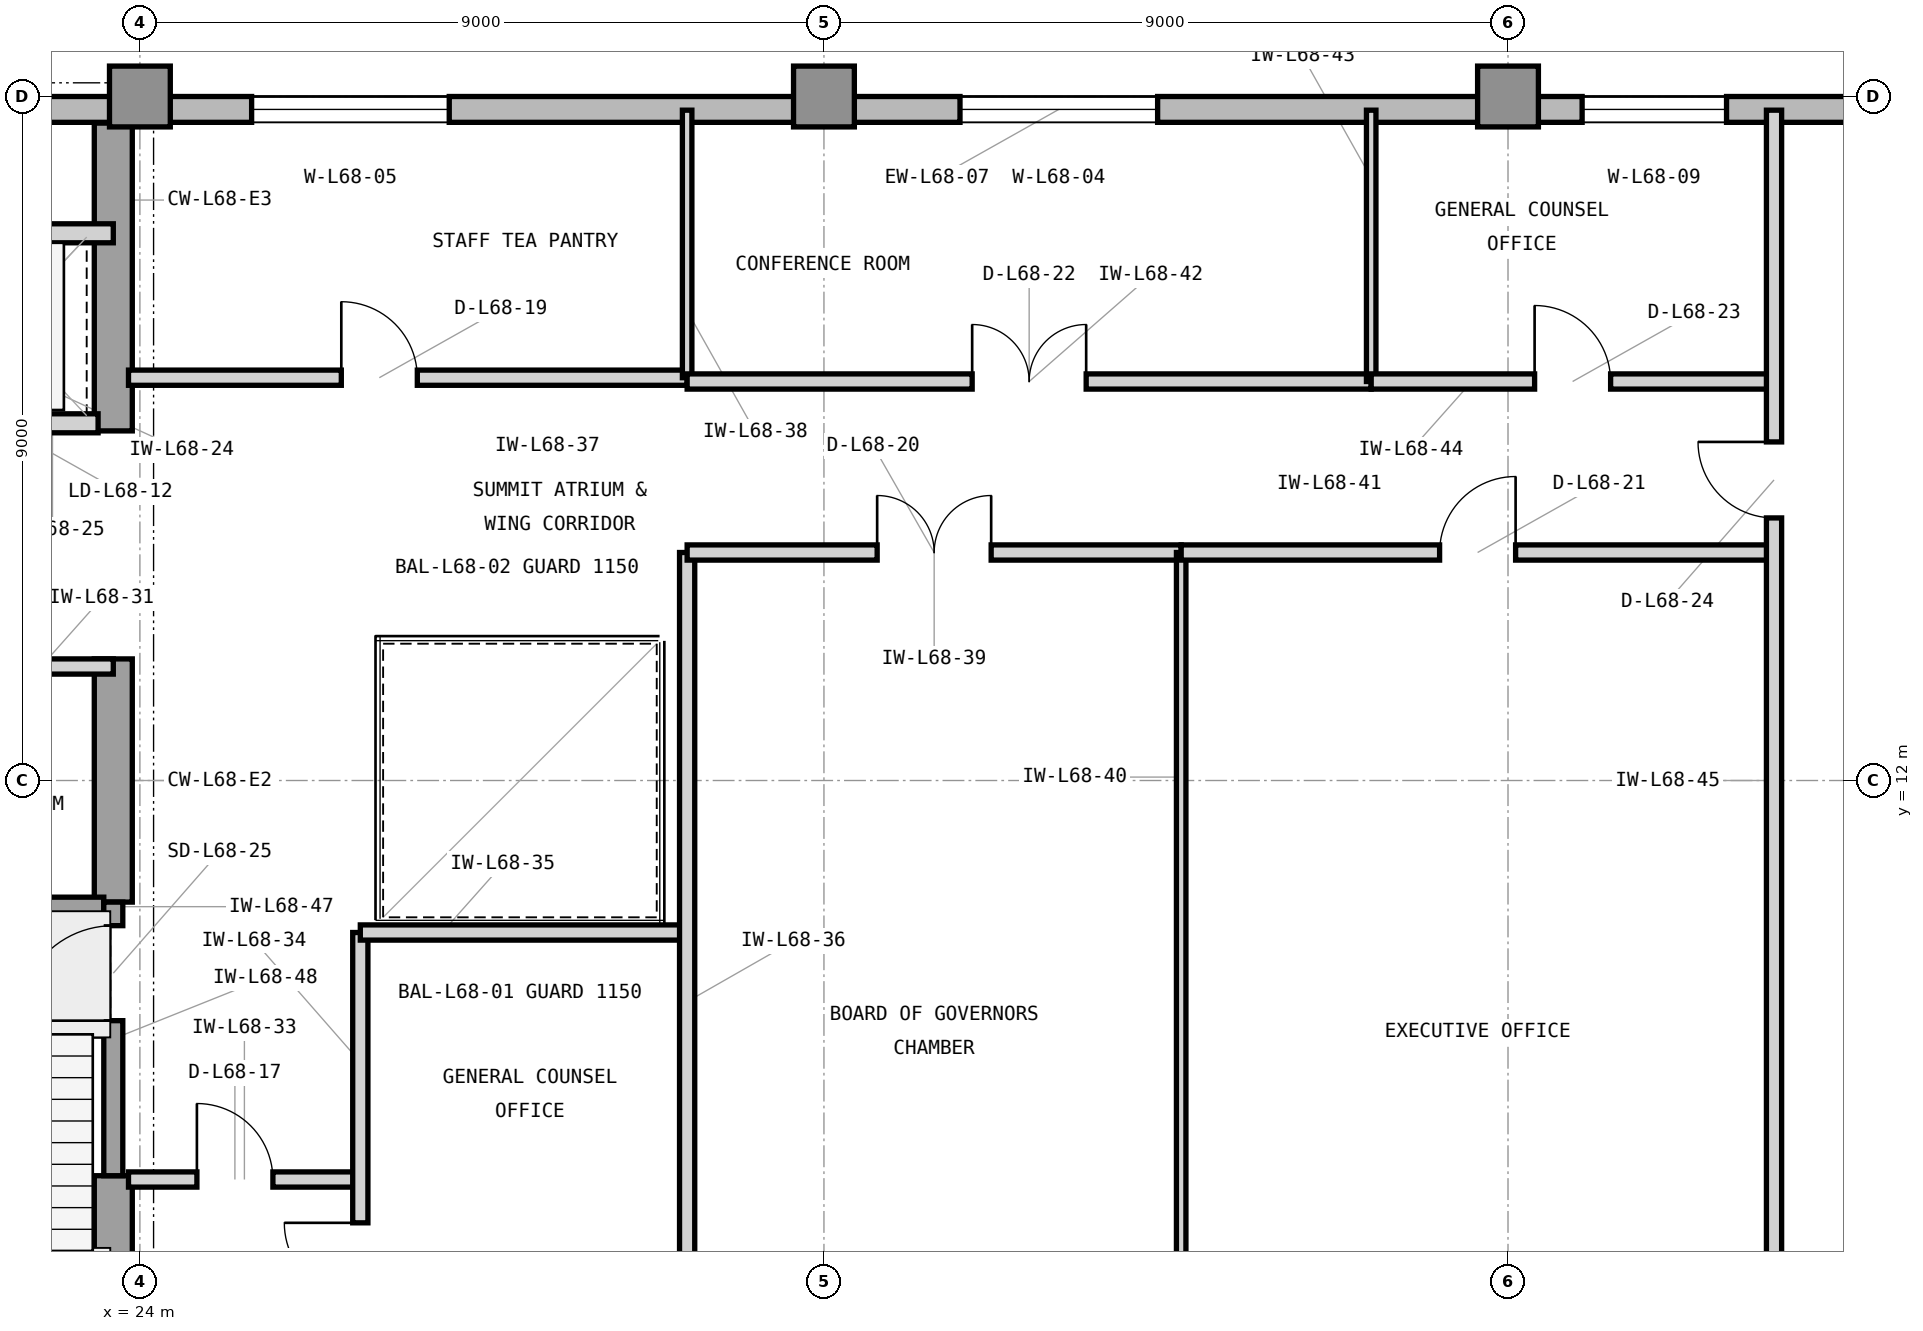
"""IFC4 building model, lengths in metres.
Left out: names, types, materials, properties, quantities, classifications, styles, units other than length and angle.
Written with IfcOpenShell. Run it as: python <this file> out.ifc"""

import sys

from ifc_helpers import new_model, si_unit, direction, frame, frame_2d, origin, origin_2d, place, context, subcontext, project, spatial, rectangle, extrude, element, fill, save


model = new_model("IFC4")
c1 = context("Model", 3, precision=1e-05, world=origin(), true_north=direction((0.0, 1.0)))
c2 = subcontext(c1, "Body", "Model", "MODEL_VIEW")
j1 = project(units=[si_unit("LENGTHUNIT", "METRE"), si_unit("PLANEANGLEUNIT", "RADIAN")], contexts=[c1])
p1 = place(None, origin())
s1 = spatial("IfcSite", under=j1, at=p1, CompositionType="ELEMENT")
p2 = place(p1, origin())
s2 = spatial("IfcBuilding", under=s1, at=p2, CompositionType="ELEMENT")
p3 = place(p2, frame((0.0, 0.0, 278.1)))
s3 = spatial("IfcBuildingStorey", under=s2, at=p3, CompositionType="ELEMENT", Elevation=278.1)
p4 = place(p3, frame((23.65, 3.6, 0.0), z_axis=(0.0, 0.0, 1.0), x_axis=(0.0, 1.0, 0.0)))
e1 = element("IfcWall", 1, at=p4, inside=s3, PredefinedType="SHEAR", context=c2, shape_type="SweptSolid", body=[
    extrude(rectangle(XDim=3.2, YDim=0.5, at=frame_2d((1.6, 0.0))), origin(), (0.0, 0.0, 1.0), 3.9),
])
p5 = place(p3, frame((23.65, 10.4, 0.0), z_axis=(0.0, 0.0, 1.0), x_axis=(0.0, 1.0, 0.0)))
e2 = element("IfcWall", 2, at=p5, inside=s3, PredefinedType="SHEAR", context=c2, shape_type="SweptSolid", body=[
    extrude(rectangle(XDim=3.2, YDim=0.5, at=frame_2d((1.6, 0.0))), origin(), (0.0, 0.0, 1.0), 3.9),
])
p6 = place(p3, frame((23.65, 16.6, 0.0), z_axis=(0.0, 0.0, 1.0), x_axis=(0.0, 1.0, 0.0)))
e3 = element("IfcWall", 3, at=p6, inside=s3, PredefinedType="SHEAR", context=c2, shape_type="SweptSolid", body=[
    extrude(rectangle(XDim=4.05, YDim=0.5, at=frame_2d((2.025, 0.0))), origin(), (0.0, 0.0, 1.0), 3.9),
])
for number, where, z_axis, x_axis in (
    (4, (24.0, 21.0, 0.0), (0.0, 0.0, 1.0), (1.0, 0.0, 0.0)),
    (5, (33.0, 21.0, 0.0), (0.0, 0.0, 1.0), (1.0, 0.0, 0.0)),
    (6, (42.0, 21.0, 0.0), (0.0, 0.0, 1.0), (1.0, 0.0, 0.0)),
):
    element("IfcColumn", number, at=place(p3, frame(where, z_axis=z_axis, x_axis=x_axis)), inside=s3, PredefinedType="COLUMN", context=c2, shape_type="SweptSolid", body=[
        extrude(rectangle(XDim=0.8, YDim=0.8, at=origin_2d()), origin(), (0.0, 0.0, 1.0), 3.9),
    ])
p7 = place(p3, frame((52.4, 20.83, 0.0), z_axis=(0.0, 0.0, 1.0), x_axis=(-1.0, 0.0, 0.0)))
e7 = element("IfcWall", 7, at=p7, inside=s3, PredefinedType="STANDARD", context=c2, shape_type="SweptSolid", body=[
    extrude(rectangle(XDim=32.62, YDim=0.34, at=frame_2d((16.31, 0.0))), origin(), (0.0, 0.0, 1.0), 3.715),
])
p8 = place(p7, frame((15.01, 0.0, 0.8)))
e8 = element("IfcOpeningElement", 8, at=p8, cuts=e7, PredefinedType="OPENING", context=c2, shape_type="SweptSolid", body=[
    extrude(rectangle(XDim=2.6, YDim=2.35, at=frame_2d((1.3, 1.175))), frame((0.0, 0.18, 0.0), z_axis=(0.0, -1.0, 0.0), x_axis=(1.0, 0.0, 0.0)), (0.0, 0.0, 1.0), 0.36),
])
p9 = place(p7, frame((24.33, 0.0, 0.8)))
e9 = element("IfcOpeningElement", 9, at=p9, cuts=e7, PredefinedType="OPENING", context=c2, shape_type="SweptSolid", body=[
    extrude(rectangle(XDim=2.6, YDim=2.35, at=frame_2d((1.3, 1.175))), frame((0.0, 0.18, 0.0), z_axis=(0.0, -1.0, 0.0), x_axis=(1.0, 0.0, 0.0)), (0.0, 0.0, 1.0), 0.36),
])
p10 = place(p7, frame((7.525, 0.0, 0.8)))
e10 = element("IfcOpeningElement", 10, at=p10, cuts=e7, PredefinedType="OPENING", context=c2, shape_type="SweptSolid", body=[
    extrude(rectangle(XDim=1.9, YDim=2.35, at=frame_2d((0.95, 1.175))), frame((0.0, 0.18, 0.0), z_axis=(0.0, -1.0, 0.0), x_axis=(1.0, 0.0, 0.0)), (0.0, 0.0, 1.0), 0.36),
])
p11 = place(p3, frame((21.05, 16.7, 0.0), z_axis=(0.0, 0.0, 1.0), x_axis=(1.0, 0.0, 0.0)))
e11 = element("IfcWall", 11, at=p11, inside=s3, PredefinedType="PARTITIONING", context=c2, shape_type="SweptSolid", body=[
    extrude(rectangle(XDim=2.4, YDim=0.25, at=frame_2d((1.2, 0.0))), origin(), (0.0, 0.0, 1.0), 3.088),
])
p12 = place(p11, frame((0.52, 0.0, 0.0)))
e12 = element("IfcOpeningElement", 12, at=p12, cuts=e11, PredefinedType="OPENING", context=c2, shape_type="SweptSolid", body=[
    extrude(rectangle(XDim=1.15, YDim=2.25, at=frame_2d((0.575, 1.125))), frame((0.0, 0.135, 0.0), z_axis=(0.0, -1.0, 0.0), x_axis=(1.0, 0.0, 0.0)), (0.0, 0.0, 1.0), 0.27),
])
p13 = place(p3, frame((16.45, 19.2, 0.0), z_axis=(0.0, 0.0, 1.0), x_axis=(1.0, 0.0, 0.0)))
e13 = element("IfcWall", 13, at=p13, inside=s3, PredefinedType="PARTITIONING", context=c2, shape_type="SweptSolid", body=[
    extrude(rectangle(XDim=7.2, YDim=0.25, at=frame_2d((3.6, 0.0))), origin(), (0.0, 0.0, 1.0), 3.705),
])
p14 = place(p3, frame((19.85, 13.5, 0.0), z_axis=(0.0, 0.0, 1.0), x_axis=(1.0, 0.0, 0.0)))
e14 = element("IfcWall", 14, at=p14, inside=s3, PredefinedType="PARTITIONING", context=c2, shape_type="SweptSolid", body=[
    extrude(rectangle(XDim=3.8, YDim=0.2, at=frame_2d((1.9, 0.0))), origin(), (0.0, 0.0, 1.0), 3.088),
])
p15 = place(p14, frame((1.425, 0.0, 0.0)))
e15 = element("IfcOpeningElement", 15, at=p15, cuts=e14, PredefinedType="OPENING", context=c2, shape_type="SweptSolid", body=[
    extrude(rectangle(XDim=0.95, YDim=2.1, at=frame_2d((0.475, 1.05))), frame((0.0, 0.11, 0.0), z_axis=(0.0, -1.0, 0.0), x_axis=(1.0, 0.0, 0.0)), (0.0, 0.0, 1.0), 0.22),
])
p16 = place(p3, frame((23.85, 6.75, 0.0), z_axis=(0.0, 0.0, 1.0), x_axis=(1.0, 0.0, 0.0)))
e16 = element("IfcWall", 16, at=p16, inside=s3, PredefinedType="PARTITIONING", context=c2, shape_type="SweptSolid", body=[
    extrude(rectangle(XDim=3.05, YDim=0.2, at=frame_2d((1.525, 0.0))), origin(), (0.0, 0.0, 1.0), 3.705),
])
p17 = place(p16, frame((0.9, 0.0, 0.0)))
e17 = element("IfcOpeningElement", 17, at=p17, cuts=e16, PredefinedType="OPENING", context=c2, shape_type="SweptSolid", body=[
    extrude(rectangle(XDim=1.0, YDim=2.15, at=frame_2d((0.5, 1.075))), frame((0.0, 0.11, 0.0), z_axis=(0.0, -1.0, 0.0), x_axis=(1.0, 0.0, 0.0)), (0.0, 0.0, 1.0), 0.22),
])
p18 = place(p3, frame((26.9, 3.18, 0.0), z_axis=(0.0, 0.0, 1.0), x_axis=(0.0, 1.0, 0.0)))
e18 = element("IfcWall", 18, at=p18, inside=s3, PredefinedType="PARTITIONING", context=c2, shape_type="SweptSolid", body=[
    extrude(rectangle(XDim=6.82, YDim=0.2, at=frame_2d((3.41, 0.0))), origin(), (0.0, 0.0, 1.0), 3.705),
])
p19 = place(p18, frame((2.0, 0.0, 0.0)))
e19 = element("IfcOpeningElement", 19, at=p19, cuts=e18, PredefinedType="OPENING", context=c2, shape_type="SweptSolid", body=[
    extrude(rectangle(XDim=1.0, YDim=2.15, at=frame_2d((0.5, 1.075))), frame((0.0, 0.11, 0.0), z_axis=(0.0, -1.0, 0.0), x_axis=(1.0, 0.0, 0.0)), (0.0, 0.0, 1.0), 0.22),
])
p20 = place(p3, frame((26.9, 10.0, 0.0), z_axis=(0.0, 0.0, 1.0), x_axis=(1.0, 0.0, 0.0)))
e20 = element("IfcWall", 20, at=p20, inside=s3, PredefinedType="PARTITIONING", context=c2, shape_type="SweptSolid", body=[
    extrude(rectangle(XDim=4.3, YDim=0.2, at=frame_2d((2.15, 0.0))), origin(), (0.0, 0.0, 1.0), 3.705),
])
p21 = place(p3, frame((31.2, 3.18, 0.0), z_axis=(0.0, 0.0, 1.0), x_axis=(0.0, 1.0, 0.0)))
e21 = element("IfcWall", 21, at=p21, inside=s3, PredefinedType="PARTITIONING", context=c2, shape_type="SweptSolid", body=[
    extrude(rectangle(XDim=11.82, YDim=0.2, at=frame_2d((5.91, 0.0))), origin(), (0.0, 0.0, 1.0), 3.705),
])
p22 = place(p3, frame((23.85, 17.3, 0.0), z_axis=(0.0, 0.0, 1.0), x_axis=(1.0, 0.0, 0.0)))
e22 = element("IfcWall", 22, at=p22, inside=s3, PredefinedType="PARTITIONING", context=c2, shape_type="SweptSolid", body=[
    extrude(rectangle(XDim=7.35, YDim=0.2, at=frame_2d((3.675, 0.0))), origin(), (0.0, 0.0, 1.0), 3.705),
])
p23 = place(p22, frame((2.8, 0.0, 0.0)))
e23 = element("IfcOpeningElement", 23, at=p23, cuts=e22, PredefinedType="OPENING", context=c2, shape_type="SweptSolid", body=[
    extrude(rectangle(XDim=1.0, YDim=2.15, at=frame_2d((0.5, 1.075))), frame((0.0, 0.11, 0.0), z_axis=(0.0, -1.0, 0.0), x_axis=(1.0, 0.0, 0.0)), (0.0, 0.0, 1.0), 0.22),
])
p24 = place(p3, frame((31.2, 17.3, 0.0), z_axis=(0.0, 0.0, 1.0), x_axis=(0.0, 1.0, 0.0)))
e24 = element("IfcWall", 24, at=p24, inside=s3, PredefinedType="PARTITIONING", context=c2, shape_type="SweptSolid", body=[
    extrude(rectangle(XDim=3.52, YDim=0.125, at=frame_2d((1.76, 0.0))), origin(), (0.0, 0.0, 1.0), 3.705),
])
p25 = place(p3, frame((31.2, 15.0, 0.0), z_axis=(0.0, 0.0, 1.0), x_axis=(1.0, 0.0, 0.0)))
e25 = element("IfcWall", 25, at=p25, inside=s3, PredefinedType="PARTITIONING", context=c2, shape_type="SweptSolid", body=[
    extrude(rectangle(XDim=6.5, YDim=0.2, at=frame_2d((3.25, 0.0))), origin(), (0.0, 0.0, 1.0), 3.301),
])
p26 = place(p25, frame((2.5, 0.0, 0.0)))
e26 = element("IfcOpeningElement", 26, at=p26, cuts=e25, PredefinedType="OPENING", context=c2, shape_type="SweptSolid", body=[
    extrude(rectangle(XDim=1.5, YDim=2.3, at=frame_2d((0.75, 1.15))), frame((0.0, 0.11, 0.0), z_axis=(0.0, -1.0, 0.0), x_axis=(1.0, 0.0, 0.0)), (0.0, 0.0, 1.0), 0.22),
])
p27 = place(p3, frame((37.7, 3.18, 0.0), z_axis=(0.0, 0.0, 1.0), x_axis=(0.0, 1.0, 0.0)))
e27 = element("IfcWall", 27, at=p27, inside=s3, PredefinedType="PARTITIONING", context=c2, shape_type="SweptSolid", body=[
    extrude(rectangle(XDim=11.82, YDim=0.125, at=frame_2d((5.91, 0.0))), origin(), (0.0, 0.0, 1.0), 3.705),
])
p28 = place(p3, frame((37.7, 15.0, 0.0), z_axis=(0.0, 0.0, 1.0), x_axis=(1.0, 0.0, 0.0)))
e28 = element("IfcWall", 28, at=p28, inside=s3, PredefinedType="PARTITIONING", context=c2, shape_type="SweptSolid", body=[
    extrude(rectangle(XDim=7.8, YDim=0.2, at=frame_2d((3.9, 0.0))), origin(), (0.0, 0.0, 1.0), 3.301),
])
p29 = place(p28, frame((3.4, 0.0, 0.0)))
e29 = element("IfcOpeningElement", 29, at=p29, cuts=e28, PredefinedType="OPENING", context=c2, shape_type="SweptSolid", body=[
    extrude(rectangle(XDim=1.0, YDim=2.15, at=frame_2d((0.5, 1.075))), frame((0.0, 0.11, 0.0), z_axis=(0.0, -1.0, 0.0), x_axis=(1.0, 0.0, 0.0)), (0.0, 0.0, 1.0), 0.22),
])
p30 = place(p3, frame((31.2, 17.25, 0.0), z_axis=(0.0, 0.0, 1.0), x_axis=(1.0, 0.0, 0.0)))
e30 = element("IfcWall", 30, at=p30, inside=s3, PredefinedType="PARTITIONING", context=c2, shape_type="SweptSolid", body=[
    extrude(rectangle(XDim=9.0, YDim=0.2, at=frame_2d((4.5, 0.0))), origin(), (0.0, 0.0, 1.0), 3.705),
])
p31 = place(p30, frame((3.75, 0.0, 0.0)))
e31 = element("IfcOpeningElement", 31, at=p31, cuts=e30, PredefinedType="OPENING", context=c2, shape_type="SweptSolid", body=[
    extrude(rectangle(XDim=1.5, YDim=2.3, at=frame_2d((0.75, 1.15))), frame((0.0, 0.11, 0.0), z_axis=(0.0, -1.0, 0.0), x_axis=(1.0, 0.0, 0.0)), (0.0, 0.0, 1.0), 0.22),
])
p32 = place(p3, frame((40.2, 17.25, 0.0), z_axis=(0.0, 0.0, 1.0), x_axis=(0.0, 1.0, 0.0)))
e32 = element("IfcWall", 32, at=p32, inside=s3, PredefinedType="PARTITIONING", context=c2, shape_type="SweptSolid", body=[
    extrude(rectangle(XDim=3.57, YDim=0.125, at=frame_2d((1.785, 0.0))), origin(), (0.0, 0.0, 1.0), 3.705),
])
p33 = place(p3, frame((40.2, 17.25, 0.0), z_axis=(0.0, 0.0, 1.0), x_axis=(1.0, 0.0, 0.0)))
e33 = element("IfcWall", 33, at=p33, inside=s3, PredefinedType="PARTITIONING", context=c2, shape_type="SweptSolid", body=[
    extrude(rectangle(XDim=5.3, YDim=0.2, at=frame_2d((2.65, 0.0))), origin(), (0.0, 0.0, 1.0), 3.705),
])
p34 = place(p33, frame((2.15, 0.0, 0.0)))
e34 = element("IfcOpeningElement", 34, at=p34, cuts=e33, PredefinedType="OPENING", context=c2, shape_type="SweptSolid", body=[
    extrude(rectangle(XDim=1.0, YDim=2.15, at=frame_2d((0.5, 1.075))), frame((0.0, 0.11, 0.0), z_axis=(0.0, -1.0, 0.0), x_axis=(1.0, 0.0, 0.0)), (0.0, 0.0, 1.0), 0.22),
])
p35 = place(p3, frame((45.5, 3.18, 0.0), z_axis=(0.0, 0.0, 1.0), x_axis=(0.0, 1.0, 0.0)))
e35 = element("IfcWall", 35, at=p35, inside=s3, PredefinedType="PARTITIONING", context=c2, shape_type="SweptSolid", body=[
    extrude(rectangle(XDim=17.64, YDim=0.2, at=frame_2d((8.82, 0.0))), origin(), (0.0, 0.0, 1.0), 3.705),
])
p36 = place(p35, frame((12.275, 0.0, 0.0)))
e36 = element("IfcOpeningElement", 36, at=p36, cuts=e35, PredefinedType="OPENING", context=c2, shape_type="SweptSolid", body=[
    extrude(rectangle(XDim=1.0, YDim=2.15, at=frame_2d((0.5, 1.075))), frame((0.0, 0.11, 0.0), z_axis=(0.0, -1.0, 0.0), x_axis=(1.0, 0.0, 0.0)), (0.0, 0.0, 1.0), 0.22),
])
p37 = place(p3, frame((19.705, 10.34, 0.0), z_axis=(0.0, 0.0, 1.0), x_axis=(1.0, 0.0, 0.0)))
e37 = element("IfcWall", 37, at=p37, inside=s3, PredefinedType="SHEAR", context=c2, shape_type="SweptSolid", body=[
    extrude(rectangle(XDim=3.82, YDim=0.25, at=frame_2d((1.91, 0.0))), origin(), (0.0, 0.0, 1.0), 3.9),
])
p38 = place(p3, frame((23.65, 6.8, 0.0), z_axis=(0.0, 0.0, 1.0), x_axis=(0.0, 1.0, 0.0)))
e38 = element("IfcWall", 38, at=p38, inside=s3, PredefinedType="SHEAR", context=c2, shape_type="SweptSolid", body=[
    extrude(rectangle(XDim=3.6, YDim=0.25, at=frame_2d((1.8, 0.0))), origin(), (0.0, 0.0, 1.0), 3.9),
])
p39 = place(p38, frame((2.04, 0.0, 0.0)))
e39 = element("IfcOpeningElement", 39, at=p39, cuts=e38, PredefinedType="OPENING", context=c2, shape_type="SweptSolid", body=[
    extrude(rectangle(XDim=1.25, YDim=2.2, at=frame_2d((0.625, 1.1))), frame((0.0, 0.135, 0.0), z_axis=(0.0, -1.0, 0.0), x_axis=(1.0, 0.0, 0.0)), (0.0, 0.0, 1.0), 0.27),
])
p40 = place(p8, origin())
e40 = element("IfcWindow", 40, at=p40, inside=s3, PartitioningType="SINGLE_PANEL", PredefinedType="WINDOW", context=c2, shape_type="SweptSolid", body=[
    extrude(rectangle(XDim=2.6, YDim=2.35, at=frame_2d((1.3, 1.175))), frame((0.0, 0.11, 0.0), z_axis=(0.0, -1.0, 0.0), x_axis=(1.0, 0.0, 0.0)), (0.0, 0.0, 1.0), 0.06),
])
fill(e8, e40)
p41 = place(p9, origin())
e41 = element("IfcWindow", 41, at=p41, inside=s3, PartitioningType="SINGLE_PANEL", PredefinedType="WINDOW", context=c2, shape_type="SweptSolid", body=[
    extrude(rectangle(XDim=2.6, YDim=2.35, at=frame_2d((1.3, 1.175))), frame((0.0, 0.11, 0.0), z_axis=(0.0, -1.0, 0.0), x_axis=(1.0, 0.0, 0.0)), (0.0, 0.0, 1.0), 0.06),
])
fill(e9, e41)
p42 = place(p17, origin())
e42 = element("IfcDoor", 42, at=p42, inside=s3, OperationType="SINGLE_SWING_LEFT", PredefinedType="DOOR", context=c2, shape_type="SweptSolid", body=[
    extrude(rectangle(XDim=1.0, YDim=2.15, at=frame_2d((0.5, 1.075))), frame((0.0, 0.025, 0.0), z_axis=(0.0, -1.0, 0.0), x_axis=(1.0, 0.0, 0.0)), (0.0, 0.0, 1.0), 0.05),
])
fill(e17, e42)
p43 = place(p19, origin())
e43 = element("IfcDoor", 43, at=p43, inside=s3, OperationType="SINGLE_SWING_RIGHT", PredefinedType="DOOR", context=c2, shape_type="SweptSolid", body=[
    extrude(rectangle(XDim=1.0, YDim=2.15, at=frame_2d((0.5, 1.075))), frame((0.0, 0.025, 0.0), z_axis=(0.0, -1.0, 0.0), x_axis=(1.0, 0.0, 0.0)), (0.0, 0.0, 1.0), 0.05),
])
fill(e19, e43)
p44 = place(p23, origin())
e44 = element("IfcDoor", 44, at=p44, inside=s3, OperationType="SINGLE_SWING_LEFT", PredefinedType="DOOR", context=c2, shape_type="SweptSolid", body=[
    extrude(rectangle(XDim=1.0, YDim=2.15, at=frame_2d((0.5, 1.075))), frame((0.0, 0.025, 0.0), z_axis=(0.0, -1.0, 0.0), x_axis=(1.0, 0.0, 0.0)), (0.0, 0.0, 1.0), 0.05),
])
fill(e23, e44)
p45 = place(p26, origin())
e45 = element("IfcDoor", 45, at=p45, inside=s3, OperationType="DOUBLE_DOOR_SINGLE_SWING", PredefinedType="DOOR", context=c2, shape_type="SweptSolid", body=[
    extrude(rectangle(XDim=1.5, YDim=2.3, at=frame_2d((0.75, 1.15))), frame((0.0, 0.025, 0.0), z_axis=(0.0, -1.0, 0.0), x_axis=(1.0, 0.0, 0.0)), (0.0, 0.0, 1.0), 0.05),
])
fill(e26, e45)
p46 = place(p29, origin())
e46 = element("IfcDoor", 46, at=p46, inside=s3, OperationType="SINGLE_SWING_RIGHT", PredefinedType="DOOR", context=c2, shape_type="SweptSolid", body=[
    extrude(rectangle(XDim=1.0, YDim=2.15, at=frame_2d((0.5, 1.075))), frame((0.0, 0.025, 0.0), z_axis=(0.0, -1.0, 0.0), x_axis=(1.0, 0.0, 0.0)), (0.0, 0.0, 1.0), 0.05),
])
fill(e29, e46)
p47 = place(p31, origin())
e47 = element("IfcDoor", 47, at=p47, inside=s3, OperationType="DOUBLE_DOOR_SINGLE_SWING", PredefinedType="DOOR", context=c2, shape_type="SweptSolid", body=[
    extrude(rectangle(XDim=1.5, YDim=2.3, at=frame_2d((0.75, 1.15))), frame((0.0, 0.025, 0.0), z_axis=(0.0, -1.0, 0.0), x_axis=(1.0, 0.0, 0.0)), (0.0, 0.0, 1.0), 0.05),
])
fill(e31, e47)
p48 = place(p34, origin())
e48 = element("IfcDoor", 48, at=p48, inside=s3, OperationType="SINGLE_SWING_LEFT", PredefinedType="DOOR", context=c2, shape_type="SweptSolid", body=[
    extrude(rectangle(XDim=1.0, YDim=2.15, at=frame_2d((0.5, 1.075))), frame((0.0, 0.025, 0.0), z_axis=(0.0, -1.0, 0.0), x_axis=(1.0, 0.0, 0.0)), (0.0, 0.0, 1.0), 0.05),
])
fill(e34, e48)
p49 = place(p36, origin())
e49 = element("IfcDoor", 49, at=p49, inside=s3, OperationType="SINGLE_SWING_RIGHT", PredefinedType="DOOR", context=c2, shape_type="SweptSolid", body=[
    extrude(rectangle(XDim=1.0, YDim=2.15, at=frame_2d((0.5, 1.075))), frame((0.0, 0.025, 0.0), z_axis=(0.0, -1.0, 0.0), x_axis=(1.0, 0.0, 0.0)), (0.0, 0.0, 1.0), 0.05),
])
fill(e36, e49)
p50 = place(p39, origin())
e50 = element("IfcDoor", 50, at=p50, inside=s3, OperationType="SINGLE_SWING_LEFT", PredefinedType="DOOR", context=c2, shape_type="SweptSolid", body=[
    extrude(rectangle(XDim=1.25, YDim=2.2, at=frame_2d((0.625, 1.1))), frame((0.0, 0.025, 0.0), z_axis=(0.0, -1.0, 0.0), x_axis=(1.0, 0.0, 0.0)), (0.0, 0.0, 1.0), 0.05),
])
fill(e39, e50)
p51 = place(p10, origin())
e51 = element("IfcWindow", 51, at=p51, inside=s3, PartitioningType="SINGLE_PANEL", PredefinedType="WINDOW", context=c2, shape_type="SweptSolid", body=[
    extrude(rectangle(XDim=1.9, YDim=2.35, at=frame_2d((0.95, 1.175))), frame((0.0, 0.11, 0.0), z_axis=(0.0, -1.0, 0.0), x_axis=(1.0, 0.0, 0.0)), (0.0, 0.0, 1.0), 0.06),
])
fill(e10, e51)
save(model, sys.argv[1])
